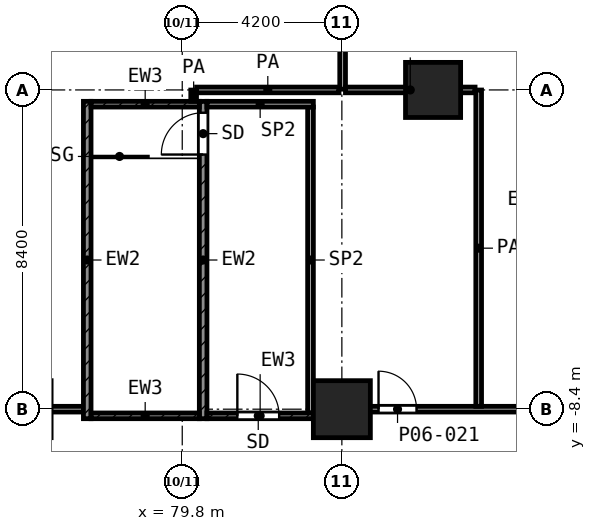
"""IFC4 building model, lengths in metres.
Left out: names, types, materials, properties, quantities, classifications, styles, units other than length and angle.
Written with IfcOpenShell. Run it as: python <this file> out.ifc"""

import sys

from ifc_helpers import new_model, si_unit, direction, frame, frame_2d, origin, origin_2d, place, context, subcontext, project, spatial, rectangle, extrude, element, fill, save


model = new_model("IFC4")
c1 = context("Model", 3, precision=1e-05, world=origin(), true_north=direction((0.0, 1.0)))
c2 = subcontext(c1, "Body", "Model", "MODEL_VIEW")
j1 = project(units=[si_unit("LENGTHUNIT", "METRE"), si_unit("PLANEANGLEUNIT", "RADIAN")], contexts=[c1])
p1 = place(None, origin())
s1 = spatial("IfcSite", under=j1, at=p1, CompositionType="ELEMENT")
p2 = place(p1, origin())
s2 = spatial("IfcBuilding", under=s1, at=p2, CompositionType="ELEMENT")
p3 = place(p2, frame((0.0, 0.0, 29.0)))
s3 = spatial("IfcBuildingStorey", under=s2, at=p3, CompositionType="ELEMENT", Elevation=29.0)
p4 = place(p3, frame((86.4, 0.0, 0.0), z_axis=(0.0, 0.0, 1.0), x_axis=(1.0, 0.0, 0.0)))
e1 = element("IfcColumn", 1, at=p4, inside=s3, PredefinedType="COLUMN", context=c2, shape_type="SweptSolid", body=[
    extrude(rectangle(XDim=1.45, YDim=1.45, at=origin_2d()), origin(), (0.0, 0.0, 1.0), 5.2),
])
p5 = place(p3, frame((84.0, -8.4, 0.0), z_axis=(0.0, 0.0, 1.0), x_axis=(1.0, 0.0, 0.0)))
e2 = element("IfcColumn", 2, at=p5, inside=s3, PredefinedType="COLUMN", context=c2, shape_type="SweptSolid", body=[
    extrude(rectangle(XDim=1.5, YDim=1.5, at=origin_2d()), origin(), (0.0, 0.0, 1.0), 5.2),
])
p6 = place(p3, frame((77.3, -8.65, 0.0), z_axis=(0.0, 0.0, 1.0), x_axis=(0.0, 1.0, 0.0)))
e3 = element("IfcWall", 3, at=p6, inside=s3, PredefinedType="SHEAR", context=c2, shape_type="SweptSolid", body=[
    extrude(rectangle(XDim=8.35, YDim=0.2, at=frame_2d((4.175, 0.0))), origin(), (0.0, 0.0, 1.0), 4.7),
])
p7 = place(p3, frame((80.35, -8.65, 0.0), z_axis=(0.0, 0.0, 1.0), x_axis=(0.0, 1.0, 0.0)))
e4 = element("IfcWall", 4, at=p7, inside=s3, PredefinedType="SHEAR", context=c2, shape_type="SweptSolid", body=[
    extrude(rectangle(XDim=8.35, YDim=0.2, at=frame_2d((4.175, 0.0))), origin(), (0.0, 0.0, 1.0), 4.7),
])
p8 = place(p7, frame((6.95, 0.0, 0.0)))
e5 = element("IfcOpeningElement", 5, at=p8, cuts=e4, PredefinedType="OPENING", context=c2, shape_type="SweptSolid", body=[
    extrude(rectangle(XDim=1.1, YDim=2.1, at=frame_2d((0.55, 1.05))), frame((0.0, 0.11, 0.0), z_axis=(0.0, -1.0, 0.0), x_axis=(1.0, 0.0, 0.0)), (0.0, 0.0, 1.0), 0.22),
])
p9 = place(p3, frame((77.4, -0.375, 0.0), z_axis=(0.0, 0.0, 1.0), x_axis=(1.0, 0.0, 0.0)))
e6 = element("IfcWall", 6, at=p9, inside=s3, PredefinedType="SHEAR", context=c2, shape_type="SweptSolid", body=[
    extrude(rectangle(XDim=2.85, YDim=0.15, at=frame_2d((1.425, 0.0))), origin(), (0.0, 0.0, 1.0), 4.7),
])
p10 = place(p3, frame((80.45, -0.375, 0.0), z_axis=(0.0, 0.0, 1.0), x_axis=(1.0, 0.0, 0.0)))
e7 = element("IfcWall", 7, at=p10, inside=s3, PredefinedType="PARTITIONING", context=c2, shape_type="SweptSolid", body=[
    extrude(rectangle(XDim=2.8, YDim=0.15, at=frame_2d((1.4, 0.0))), origin(), (0.0, 0.0, 1.0), 4.7),
])
p11 = place(p3, frame((77.4, -8.575, 0.0), z_axis=(0.0, 0.0, 1.0), x_axis=(1.0, 0.0, 0.0)))
e8 = element("IfcWall", 8, at=p11, inside=s3, PredefinedType="SHEAR", context=c2, shape_type="SweptSolid", body=[
    extrude(rectangle(XDim=2.85, YDim=0.15, at=frame_2d((1.425, 0.0))), origin(), (0.0, 0.0, 1.0), 4.7),
])
p12 = place(p3, frame((80.45, -8.575, 0.0), z_axis=(0.0, 0.0, 1.0), x_axis=(1.0, 0.0, 0.0)))
e9 = element("IfcWall", 9, at=p12, inside=s3, PredefinedType="SHEAR", context=c2, shape_type="SweptSolid", body=[
    extrude(rectangle(XDim=2.8, YDim=0.15, at=frame_2d((1.4, 0.0))), origin(), (0.0, 0.0, 1.0), 4.7),
])
p13 = place(p12, frame((0.8, 0.0, 0.0)))
e10 = element("IfcOpeningElement", 10, at=p13, cuts=e9, PredefinedType="OPENING", context=c2, shape_type="SweptSolid", body=[
    extrude(rectangle(XDim=1.1, YDim=2.1, at=frame_2d((0.55, 1.05))), frame((0.0, 0.085, 0.0), z_axis=(0.0, -1.0, 0.0), x_axis=(1.0, 0.0, 0.0)), (0.0, 0.0, 1.0), 0.17),
])
p14 = place(p3, frame((83.175, -8.5, 0.0), z_axis=(0.0, 0.0, 1.0), x_axis=(0.0, 1.0, 0.0)))
e11 = element("IfcWall", 11, at=p14, inside=s3, PredefinedType="PARTITIONING", context=c2, shape_type="SweptSolid", body=[
    extrude(rectangle(XDim=8.05, YDim=0.15, at=frame_2d((4.025, 0.0))), origin(), (0.0, 0.0, 1.0), 4.7),
])
p15 = place(p3, frame((51.0, -8.4, 0.0), z_axis=(0.0, 0.0, 1.0), x_axis=(1.0, 0.0, 0.0)))
e12 = element("IfcWall", 12, at=p15, inside=s3, PredefinedType="PARTITIONING", context=c2, shape_type="SweptSolid", body=[
    extrude(rectangle(XDim=26.2, YDim=0.15, at=frame_2d((13.1, 0.0))), origin(), (0.0, 0.0, 1.0), 4.7),
])
p16 = place(p15, frame((1.144, 0.0, 0.0)))
e13 = element("IfcOpeningElement", 13, at=p16, cuts=e12, PredefinedType="OPENING", context=c2, shape_type="SweptSolid", body=[
    extrude(rectangle(XDim=1.5, YDim=2.1, at=frame_2d((0.75, 1.05))), frame((0.0, 0.085, 0.0), z_axis=(0.0, -1.0, 0.0), x_axis=(1.0, 0.0, 0.0)), (0.0, 0.0, 1.0), 0.17),
])
p17 = place(p15, frame((3.112, 0.0, 0.0)))
e14 = element("IfcOpeningElement", 14, at=p17, cuts=e12, PredefinedType="OPENING", context=c2, shape_type="SweptSolid", body=[
    extrude(rectangle(XDim=1.5, YDim=2.1, at=frame_2d((0.75, 1.05))), frame((0.0, 0.085, 0.0), z_axis=(0.0, -1.0, 0.0), x_axis=(1.0, 0.0, 0.0)), (0.0, 0.0, 1.0), 0.17),
])
p18 = place(p15, frame((5.081, 0.0, 0.0)))
e15 = element("IfcOpeningElement", 15, at=p18, cuts=e12, PredefinedType="OPENING", context=c2, shape_type="SweptSolid", body=[
    extrude(rectangle(XDim=1.5, YDim=2.1, at=frame_2d((0.75, 1.05))), frame((0.0, 0.085, 0.0), z_axis=(0.0, -1.0, 0.0), x_axis=(1.0, 0.0, 0.0)), (0.0, 0.0, 1.0), 0.17),
])
p19 = place(p15, frame((9.15, 0.0, 0.0)))
e16 = element("IfcOpeningElement", 16, at=p19, cuts=e12, PredefinedType="OPENING", context=c2, shape_type="SweptSolid", body=[
    extrude(rectangle(XDim=1.5, YDim=2.1, at=frame_2d((0.75, 1.05))), frame((0.0, 0.085, 0.0), z_axis=(0.0, -1.0, 0.0), x_axis=(1.0, 0.0, 0.0)), (0.0, 0.0, 1.0), 0.17),
])
p20 = place(p15, frame((11.25, 0.0, 0.0)))
e17 = element("IfcOpeningElement", 17, at=p20, cuts=e12, PredefinedType="OPENING", context=c2, shape_type="SweptSolid", body=[
    extrude(rectangle(XDim=1.5, YDim=2.1, at=frame_2d((0.75, 1.05))), frame((0.0, 0.085, 0.0), z_axis=(0.0, -1.0, 0.0), x_axis=(1.0, 0.0, 0.0)), (0.0, 0.0, 1.0), 0.17),
])
p21 = place(p15, frame((13.35, 0.0, 0.0)))
e18 = element("IfcOpeningElement", 18, at=p21, cuts=e12, PredefinedType="OPENING", context=c2, shape_type="SweptSolid", body=[
    extrude(rectangle(XDim=1.5, YDim=2.1, at=frame_2d((0.75, 1.05))), frame((0.0, 0.085, 0.0), z_axis=(0.0, -1.0, 0.0), x_axis=(1.0, 0.0, 0.0)), (0.0, 0.0, 1.0), 0.17),
])
p22 = place(p15, frame((17.65, 0.0, 0.0)))
e19 = element("IfcOpeningElement", 19, at=p22, cuts=e12, PredefinedType="OPENING", context=c2, shape_type="SweptSolid", body=[
    extrude(rectangle(XDim=1.0, YDim=2.1, at=frame_2d((0.5, 1.05))), frame((0.0, 0.085, 0.0), z_axis=(0.0, -1.0, 0.0), x_axis=(1.0, 0.0, 0.0)), (0.0, 0.0, 1.0), 0.17),
])
p23 = place(p15, frame((20.875, 0.0, 0.0)))
e20 = element("IfcOpeningElement", 20, at=p23, cuts=e12, PredefinedType="OPENING", context=c2, shape_type="SweptSolid", body=[
    extrude(rectangle(XDim=1.5, YDim=2.1, at=frame_2d((0.75, 1.05))), frame((0.0, 0.085, 0.0), z_axis=(0.0, -1.0, 0.0), x_axis=(1.0, 0.0, 0.0)), (0.0, 0.0, 1.0), 0.17),
])
p24 = place(p15, frame((22.7, 0.0, 0.0)))
e21 = element("IfcOpeningElement", 21, at=p24, cuts=e12, PredefinedType="OPENING", context=c2, shape_type="SweptSolid", body=[
    extrude(rectangle(XDim=1.1, YDim=2.1, at=frame_2d((0.55, 1.05))), frame((0.0, 0.085, 0.0), z_axis=(0.0, -1.0, 0.0), x_axis=(1.0, 0.0, 0.0)), (0.0, 0.0, 1.0), 0.17),
])
p25 = place(p3, frame((83.33, -8.4, 0.0), z_axis=(0.0, 0.0, 1.0), x_axis=(1.0, 0.0, 0.0)))
e22 = element("IfcWall", 22, at=p25, inside=s3, PredefinedType="PARTITIONING", context=c2, shape_type="SweptSolid", body=[
    extrude(rectangle(XDim=12.75, YDim=0.15, at=frame_2d((6.375, 0.0))), origin(), (0.0, 0.0, 1.0), 4.7),
])
p26 = place(p25, frame((1.635, 0.0, 0.0)))
e23 = element("IfcOpeningElement", 23, at=p26, cuts=e22, PredefinedType="OPENING", context=c2, shape_type="SweptSolid", body=[
    extrude(rectangle(XDim=1.0, YDim=2.1, at=frame_2d((0.5, 1.05))), frame((0.0, 0.085, 0.0), z_axis=(0.0, -1.0, 0.0), x_axis=(1.0, 0.0, 0.0)), (0.0, 0.0, 1.0), 0.17),
])
p27 = place(p25, frame((8.17, 0.0, 0.0)))
e24 = element("IfcOpeningElement", 24, at=p27, cuts=e22, PredefinedType="OPENING", context=c2, shape_type="SweptSolid", body=[
    extrude(rectangle(XDim=1.0, YDim=2.1, at=frame_2d((0.5, 1.05))), frame((0.0, 0.085, 0.0), z_axis=(0.0, -1.0, 0.0), x_axis=(1.0, 0.0, 0.0)), (0.0, 0.0, 1.0), 0.17),
])
p28 = place(p3, frame((80.178, 0.0, 0.0), z_axis=(0.0, 0.0, 1.0), x_axis=(1.0, 0.0, 0.0)))
e25 = element("IfcWall", 25, at=p28, inside=s3, PredefinedType="PARTITIONING", context=c2, shape_type="SweptSolid", body=[
    extrude(rectangle(XDim=3.747, YDim=0.15, at=frame_2d((1.874, 0.0))), origin(), (0.0, 0.0, 1.0), 4.7),
])
p29 = place(p3, frame((84.095, 0.0, 0.0), z_axis=(0.0, 0.0, 1.0), x_axis=(1.0, 0.0, 0.0)))
e26 = element("IfcWall", 26, at=p29, inside=s3, PredefinedType="PARTITIONING", context=c2, shape_type="SweptSolid", body=[
    extrude(rectangle(XDim=3.41, YDim=0.15, at=frame_2d((1.705, 0.0))), origin(), (0.0, 0.0, 1.0), 4.7),
])
p30 = place(p3, frame((80.1, -0.3, 0.0), z_axis=(0.0, 0.0, 1.0), x_axis=(0.0, 1.0, 0.0)))
e27 = element("IfcWall", 27, at=p30, inside=s3, PredefinedType="PARTITIONING", context=c2, shape_type="SweptSolid", body=[
    extrude(rectangle(XDim=0.297, YDim=0.15, at=frame_2d((0.148, 0.0))), origin(), (0.0, 0.0, 1.0), 4.7),
])
p31 = place(p3, frame((84.02, 0.02, 0.0), z_axis=(0.0, 0.0, 1.0), x_axis=(0.0, 1.0, 0.0)))
e28 = element("IfcWall", 28, at=p31, inside=s3, PredefinedType="PARTITIONING", context=c2, shape_type="SweptSolid", body=[
    extrude(rectangle(XDim=3.66, YDim=0.15, at=frame_2d((1.83, 0.0))), origin(), (0.0, 0.0, 1.0), 4.7),
])
p32 = place(p3, frame((87.6, -8.325, 0.0), z_axis=(0.0, 0.0, 1.0), x_axis=(0.0, 1.0, 0.0)))
e29 = element("IfcWall", 29, at=p32, inside=s3, PredefinedType="PARTITIONING", context=c2, shape_type="SweptSolid", body=[
    extrude(rectangle(XDim=8.323, YDim=0.15, at=frame_2d((4.162, 0.0))), origin(), (0.0, 0.0, 1.0), 4.7),
])
p33 = place(p8, origin())
e30 = element("IfcDoor", 30, at=p33, inside=s3, OperationType="SINGLE_SWING_LEFT", PredefinedType="DOOR", context=c2, shape_type="SweptSolid", body=[
    extrude(rectangle(XDim=1.1, YDim=2.1, at=frame_2d((0.55, 1.05))), frame((0.0, 0.025, 0.0), z_axis=(0.0, -1.0, 0.0), x_axis=(1.0, 0.0, 0.0)), (0.0, 0.0, 1.0), 0.05),
])
fill(e5, e30)
p34 = place(p13, origin())
e31 = element("IfcDoor", 31, at=p34, inside=s3, OperationType="SINGLE_SWING_LEFT", PredefinedType="DOOR", context=c2, shape_type="SweptSolid", body=[
    extrude(rectangle(XDim=1.1, YDim=2.1, at=frame_2d((0.55, 1.05))), frame((0.0, 0.025, 0.0), z_axis=(0.0, -1.0, 0.0), x_axis=(1.0, 0.0, 0.0)), (0.0, 0.0, 1.0), 0.05),
])
fill(e10, e31)
p35 = place(p26, origin())
e32 = element("IfcDoor", 32, at=p35, inside=s3, OperationType="SINGLE_SWING_LEFT", PredefinedType="DOOR", context=c2, shape_type="SweptSolid", body=[
    extrude(rectangle(XDim=1.0, YDim=2.1, at=frame_2d((0.5, 1.05))), frame((0.0, 0.025, 0.0), z_axis=(0.0, -1.0, 0.0), x_axis=(1.0, 0.0, 0.0)), (0.0, 0.0, 1.0), 0.05),
])
fill(e23, e32)
save(model, sys.argv[1])
